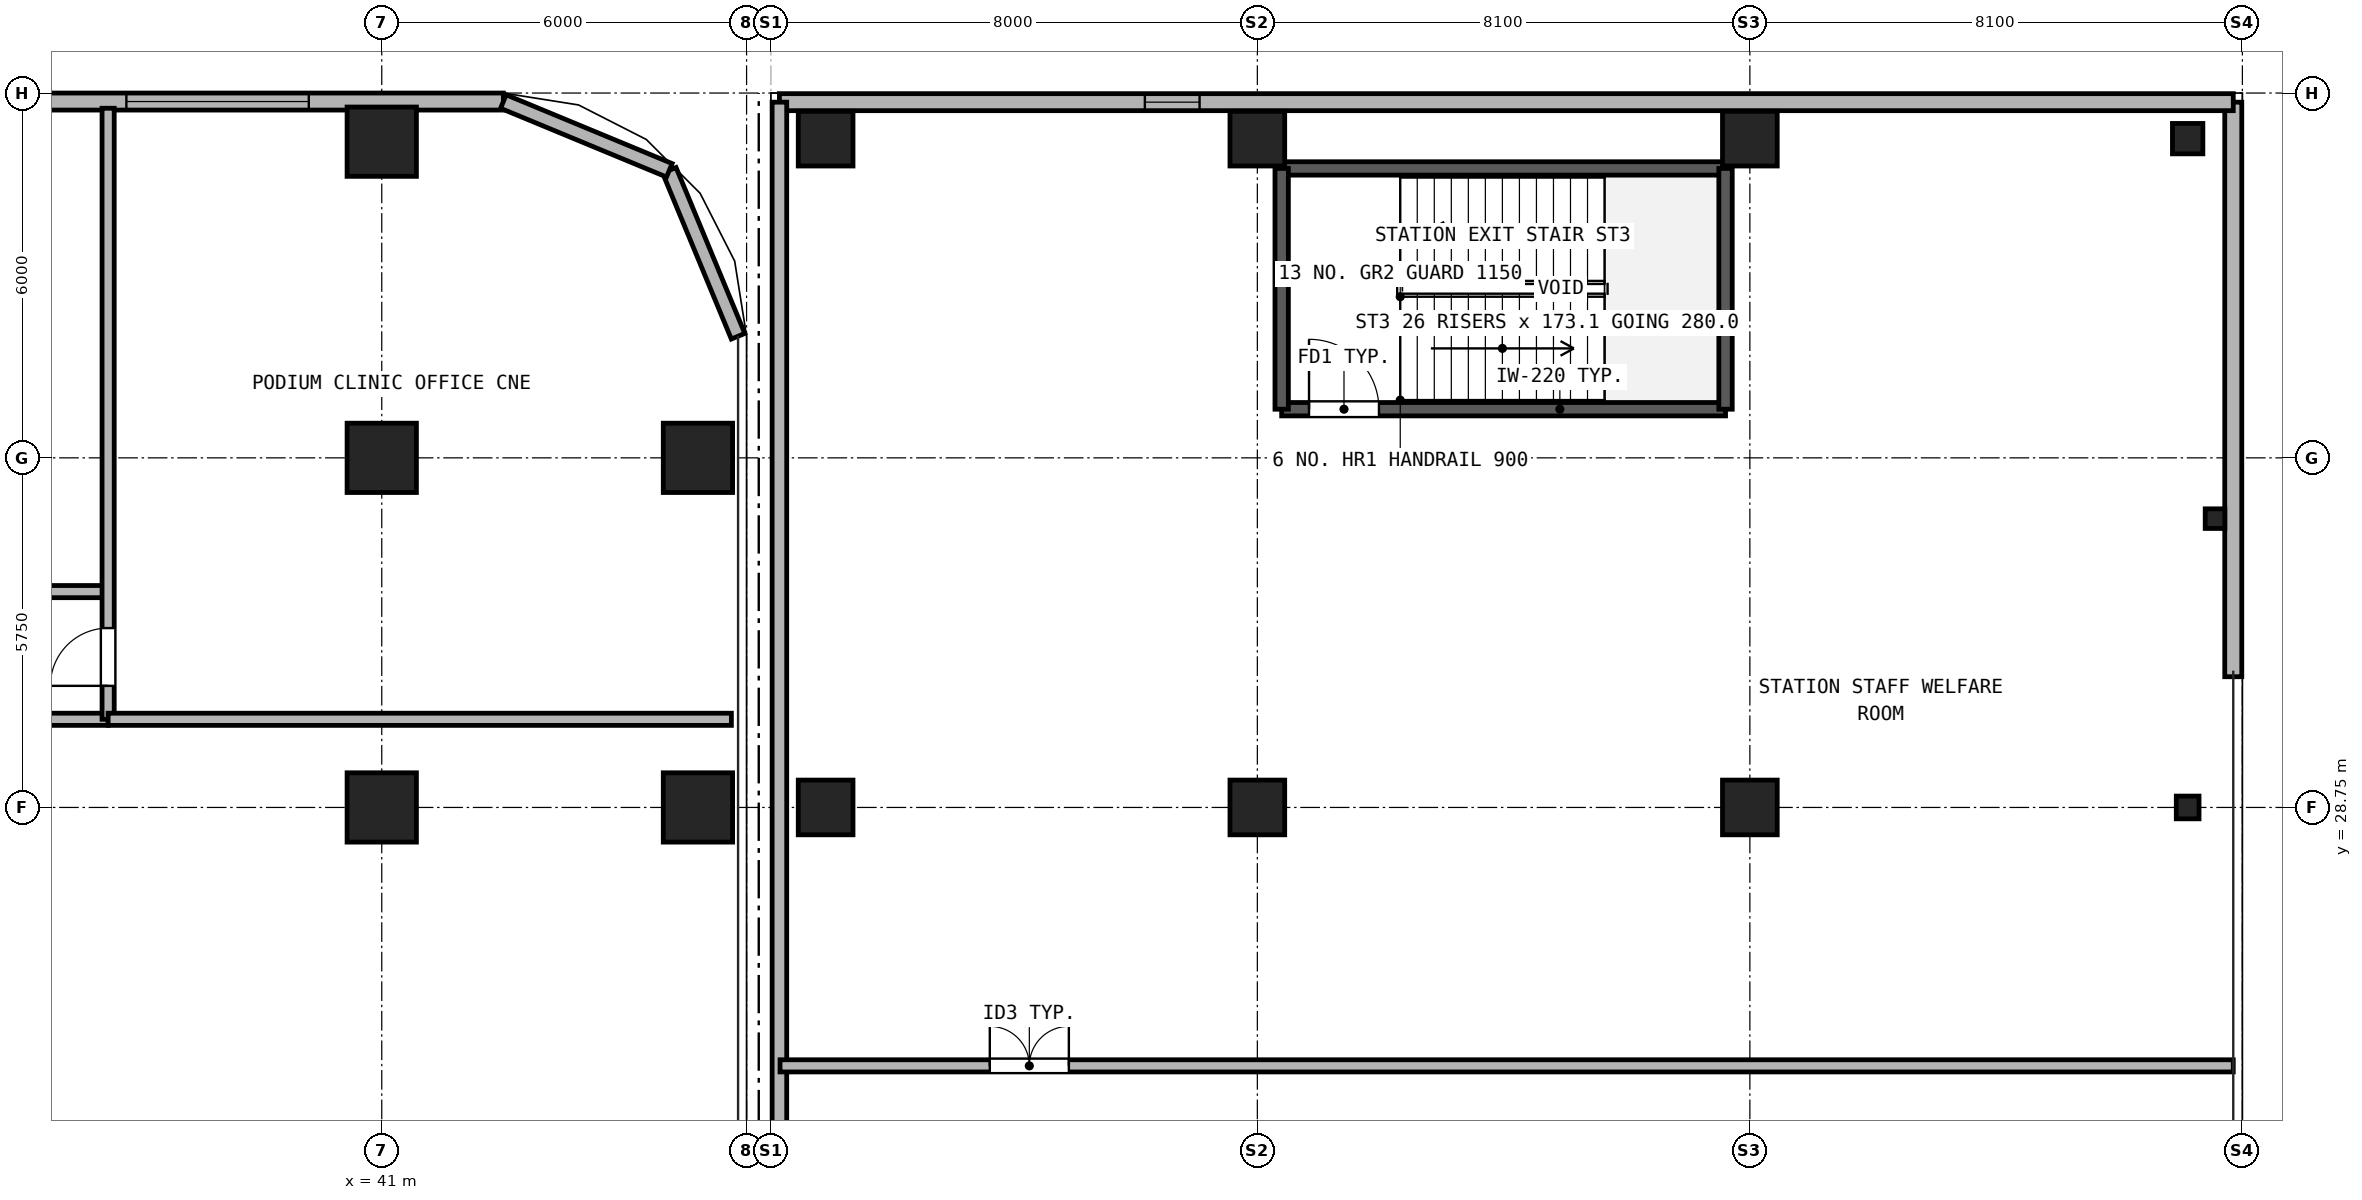
"""IFC4 building model, lengths in metres.
Left out: names, types, materials, properties, quantities, classifications, styles, units other than length and angle.
Written with IfcOpenShell. Run it as: python <this file> out.ifc"""

import sys

from ifc_helpers import new_model, si_unit, direction, frame, frame_2d, origin, origin_2d, place, context, subcontext, project, spatial, rectangle, hollow_rectangle, i_section, extrude, source, transform, mapped, element, fill, save


model = new_model("IFC4")
c1 = context("Model", 3, precision=1e-05, world=origin(), true_north=direction((0.0, 1.0)))
c2 = subcontext(c1, "Body", "Model", "MODEL_VIEW")
j1 = project(units=[si_unit("LENGTHUNIT", "METRE"), si_unit("PLANEANGLEUNIT", "RADIAN")], contexts=[c1])
p1 = place(None, origin())
s1 = spatial("IfcSite", under=j1, at=p1, CompositionType="ELEMENT")
p2 = place(p1, origin())
s2 = spatial("IfcBuilding", under=s1, at=p2, CompositionType="ELEMENT")
p3 = place(p2, frame((0.0, 0.0, 13.5)))
s3 = spatial("IfcBuildingStorey", under=s2, at=p3, CompositionType="ELEMENT", Elevation=13.5)
m1 = source(origin(), c2, "Body", "SweptSolid", [
    extrude(hollow_rectangle(XDim=1.14, YDim=1.14, WallThickness=0.07, at=origin_2d()), origin(), (0.0, 0.0, 1.0), 4.18),
])
for number, where, z_axis, x_axis in (
    (1, (41.0, 39.7, 0.0), (0.0, 0.0, 1.0), (1.0, 0.0, 0.0)),
    (2, (46.2, 28.75, 0.0), (0.0, 0.0, 1.0), (1.0, 0.0, 0.0)),
    (3, (46.2, 34.5, 0.0), (0.0, 0.0, 1.0), (1.0, 0.0, 0.0)),
    (4, (41.0, 28.75, 0.0), (0.0, 0.0, 1.0), (1.0, 0.0, 0.0)),
    (5, (41.0, 34.5, 0.0), (0.0, 0.0, 1.0), (1.0, 0.0, 0.0)),
):
    element("IfcColumn", number, at=place(p3, frame(where, z_axis=z_axis, x_axis=x_axis)), inside=s3, PredefinedType="COLUMN", context=c2, shape_type="MappedRepresentation", body=[
        mapped(m1, transform((0.0, 0.0, 0.0), x_axis=(1.0, 0.0, 0.0), y_axis=(0.0, 1.0, 0.0), z_axis=(0.0, 0.0, 1.0), scale=1.0)),
    ])
m2 = source(origin(), c2, "Body", "SweptSolid", [
    extrude(hollow_rectangle(XDim=0.7, YDim=0.9, WallThickness=0.04, at=origin_2d()), origin(), (0.0, 0.0, 1.0), 4.18),
])
for number, where, z_axis, x_axis in (
    (6, (48.3, 28.75, 0.0), (0.0, 0.0, 1.0), (1.0, 0.0, 0.0)),
    (7, (48.3, 39.75, 0.0), (0.0, 0.0, 1.0), (1.0, 0.0, 0.0)),
    (8, (55.4, 28.75, 0.0), (0.0, 0.0, 1.0), (1.0, 0.0, 0.0)),
    (9, (55.4, 39.75, 0.0), (0.0, 0.0, 1.0), (1.0, 0.0, 0.0)),
    (10, (63.5, 28.75, 0.0), (0.0, 0.0, 1.0), (1.0, 0.0, 0.0)),
    (11, (63.5, 39.75, 0.0), (0.0, 0.0, 1.0), (1.0, 0.0, 0.0)),
):
    element("IfcColumn", number, at=place(p3, frame(where, z_axis=z_axis, x_axis=x_axis)), inside=s3, PredefinedType="COLUMN", context=c2, shape_type="MappedRepresentation", body=[
        mapped(m2, transform((0.0, 0.0, 0.0), x_axis=(1.0, 0.0, 0.0), y_axis=(0.0, 1.0, 0.0), z_axis=(0.0, 0.0, 1.0), scale=1.0)),
    ])
m3 = source(origin(), c2, "Body", "SweptSolid", [
    extrude(i_section(OverallWidth=0.374, OverallDepth=0.372, WebThickness=0.016, FlangeThickness=0.026, at=origin_2d()), origin(), (0.0, 0.0, 1.0), 4.18),
])
p4 = place(p3, frame((70.7, 28.75, 0.0), z_axis=(0.0, 0.0, 1.0), x_axis=(1.0, 0.0, 0.0)))
e12 = element("IfcColumn", 12, at=p4, inside=s3, PredefinedType="COLUMN", context=c2, shape_type="MappedRepresentation", body=[
    mapped(m3, transform((0.0, 0.0, 0.0), x_axis=(1.0, 0.0, 0.0), y_axis=(0.0, 1.0, 0.0), z_axis=(0.0, 0.0, 1.0), scale=1.0)),
])
m4 = source(origin(), c2, "Body", "SweptSolid", [
    extrude(hollow_rectangle(XDim=0.5, YDim=0.5, WallThickness=0.025, at=origin_2d()), origin(), (0.0, 0.0, 1.0), 4.18),
])
p5 = place(p3, frame((70.7, 39.75, 0.0), z_axis=(0.0, 0.0, 1.0), x_axis=(1.0, 0.0, 0.0)))
e13 = element("IfcColumn", 13, at=p5, inside=s3, PredefinedType="COLUMN", context=c2, shape_type="MappedRepresentation", body=[
    mapped(m4, transform((0.0, 0.0, 0.0), x_axis=(1.0, 0.0, 0.0), y_axis=(0.0, 1.0, 0.0), z_axis=(0.0, 0.0, 1.0), scale=1.0)),
])
m5 = source(origin(), c2, "Body", "SweptSolid", [
    extrude(i_section(OverallWidth=0.309, OverallDepth=0.323, WebThickness=0.014, FlangeThickness=0.023, at=origin_2d()), origin(), (0.0, 0.0, 1.0), 4.18),
])
p6 = place(p3, frame((71.15, 33.5, 0.0), z_axis=(0.0, 0.0, 1.0), x_axis=(1.0, 0.0, 0.0)))
e14 = element("IfcColumn", 14, at=p6, inside=s3, PredefinedType="PILASTER", context=c2, shape_type="MappedRepresentation", body=[
    mapped(m5, transform((0.0, 0.0, 0.0), x_axis=(1.0, 0.0, 0.0), y_axis=(0.0, 1.0, 0.0), z_axis=(0.0, 0.0, 1.0), scale=1.0)),
])
p7 = place(p3, frame((4.0, 40.36, 0.0), z_axis=(0.0, 0.0, 1.0), x_axis=(1.0, 0.0, 0.0)))
e15 = element("IfcWall", 15, at=p7, inside=s3, PredefinedType="SOLIDWALL", context=c2, shape_type="SweptSolid", body=[
    extrude(rectangle(XDim=39.0, YDim=0.28, at=frame_2d((19.5, 0.0))), origin(), (0.0, 0.0, 1.0), 4.18),
])
p8 = place(p7, frame((4.0, 0.0, 0.9)))
e16 = element("IfcOpeningElement", 16, at=p8, cuts=e15, PredefinedType="OPENING", context=c2, shape_type="SweptSolid", body=[
    extrude(rectangle(XDim=3.0, YDim=2.25, at=frame_2d((1.5, 1.125))), frame((0.0, 0.15, 0.0), z_axis=(0.0, -1.0, 0.0), x_axis=(1.0, 0.0, 0.0)), (0.0, 0.0, 1.0), 0.3),
])
p9 = place(p7, frame((10.4, 0.0, 0.9)))
e17 = element("IfcOpeningElement", 17, at=p9, cuts=e15, PredefinedType="OPENING", context=c2, shape_type="SweptSolid", body=[
    extrude(rectangle(XDim=3.0, YDim=2.25, at=frame_2d((1.5, 1.125))), frame((0.0, 0.15, 0.0), z_axis=(0.0, -1.0, 0.0), x_axis=(1.0, 0.0, 0.0)), (0.0, 0.0, 1.0), 0.3),
])
p10 = place(p7, frame((19.5, 0.0, 0.9)))
e18 = element("IfcOpeningElement", 18, at=p10, cuts=e15, PredefinedType="OPENING", context=c2, shape_type="SweptSolid", body=[
    extrude(rectangle(XDim=3.0, YDim=2.25, at=frame_2d((1.5, 1.125))), frame((0.0, 0.15, 0.0), z_axis=(0.0, -1.0, 0.0), x_axis=(1.0, 0.0, 0.0)), (0.0, 0.0, 1.0), 0.3),
])
p11 = place(p7, frame((25.8, 0.0, 0.9)))
e19 = element("IfcOpeningElement", 19, at=p11, cuts=e15, PredefinedType="OPENING", context=c2, shape_type="SweptSolid", body=[
    extrude(rectangle(XDim=3.0, YDim=2.25, at=frame_2d((1.5, 1.125))), frame((0.0, 0.15, 0.0), z_axis=(0.0, -1.0, 0.0), x_axis=(1.0, 0.0, 0.0)), (0.0, 0.0, 1.0), 0.3),
])
p12 = place(p7, frame((32.8, 0.0, 0.9)))
e20 = element("IfcOpeningElement", 20, at=p12, cuts=e15, PredefinedType="OPENING", context=c2, shape_type="SweptSolid", body=[
    extrude(rectangle(XDim=3.0, YDim=2.25, at=frame_2d((1.5, 1.125))), frame((0.0, 0.15, 0.0), z_axis=(0.0, -1.0, 0.0), x_axis=(1.0, 0.0, 0.0)), (0.0, 0.0, 1.0), 0.3),
])
for number, where, z_axis, x_axis in (
    (21, (46.86, 36.5, 0.0), (0.0, 0.0, 1.0), (-0.383, 0.924, 0.0)),
    (22, (45.729, 39.229, 0.0), (0.0, 0.0, 1.0), (-0.924, 0.383, 0.0)),
):
    element("IfcWall", number, at=place(p3, frame(where, z_axis=z_axis, x_axis=x_axis)), inside=s3, PredefinedType="SOLIDWALL", context=c2, shape_type="SweptSolid", body=[
        extrude(rectangle(XDim=2.954, YDim=0.24, at=frame_2d((1.477, 0.0))), origin(), (0.0, 0.0, 1.0), 4.18),
    ])
p13 = place(p3, frame((71.45, 30.9, 0.0), z_axis=(0.0, 0.0, 1.0), x_axis=(0.0, 1.0, 0.0)))
e23 = element("IfcWall", 23, at=p13, inside=s3, PredefinedType="SOLIDWALL", context=c2, shape_type="SweptSolid", body=[
    extrude(rectangle(XDim=9.45, YDim=0.28, at=frame_2d((4.725, 0.0))), origin(), (0.0, 0.0, 1.0), 4.18),
])
p14 = place(p3, frame((47.54, 40.35, 0.0), z_axis=(0.0, 0.0, 1.0), x_axis=(1.0, 0.0, 0.0)))
e24 = element("IfcWall", 24, at=p14, inside=s3, PredefinedType="SOLIDWALL", context=c2, shape_type="SweptSolid", body=[
    extrude(rectangle(XDim=23.91, YDim=0.28, at=frame_2d((11.955, 0.0))), origin(), (0.0, 0.0, 1.0), 4.18),
])
p15 = place(p14, frame((6.01, 0.0, 1.1)))
e25 = element("IfcOpeningElement", 25, at=p15, cuts=e24, PredefinedType="OPENING", context=c2, shape_type="SweptSolid", body=[
    extrude(rectangle(XDim=0.9, YDim=1.5, at=frame_2d((0.45, 0.75))), frame((0.0, 0.15, 0.0), z_axis=(0.0, -1.0, 0.0), x_axis=(1.0, 0.0, 0.0)), (0.0, 0.0, 1.0), 0.3),
])
p16 = place(p3, frame((47.54, -0.54, 0.0), z_axis=(0.0, 0.0, 1.0), x_axis=(0.0, 1.0, 0.0)))
e26 = element("IfcWall", 26, at=p16, inside=s3, PredefinedType="SOLIDWALL", context=c2, shape_type="SweptSolid", body=[
    extrude(rectangle(XDim=40.89, YDim=0.24, at=frame_2d((20.445, 0.0))), origin(), (0.0, 0.0, 1.0), 4.18),
])
p17 = place(p3, frame((10.5, 32.3, 0.0), z_axis=(0.0, 0.0, 1.0), x_axis=(1.0, 0.0, 0.0)))
e27 = element("IfcWall", 27, at=p17, inside=s3, PredefinedType="PARTITIONING", context=c2, shape_type="SweptSolid", body=[
    extrude(rectangle(XDim=26.0, YDim=0.2, at=frame_2d((13.0, 0.0))), origin(), (0.0, 0.0, 1.0), 4.18),
])
p18 = place(p17, frame((4.75, 0.0, 0.0)))
e28 = element("IfcOpeningElement", 28, at=p18, cuts=e27, PredefinedType="OPENING", context=c2, shape_type="SweptSolid", body=[
    extrude(rectangle(XDim=0.95, YDim=2.15, at=frame_2d((0.475, 1.075))), frame((0.0, 0.11, 0.0), z_axis=(0.0, -1.0, 0.0), x_axis=(1.0, 0.0, 0.0)), (0.0, 0.0, 1.0), 0.22),
])
p19 = place(p17, frame((14.0, 0.0, 0.0)))
e29 = element("IfcOpeningElement", 29, at=p19, cuts=e27, PredefinedType="OPENING", context=c2, shape_type="SweptSolid", body=[
    extrude(rectangle(XDim=0.95, YDim=2.15, at=frame_2d((0.475, 1.075))), frame((0.0, 0.11, 0.0), z_axis=(0.0, -1.0, 0.0), x_axis=(1.0, 0.0, 0.0)), (0.0, 0.0, 1.0), 0.22),
])
p20 = place(p17, frame((21.75, 0.0, 0.0)))
e30 = element("IfcOpeningElement", 30, at=p20, cuts=e27, PredefinedType="OPENING", context=c2, shape_type="SweptSolid", body=[
    extrude(rectangle(XDim=0.95, YDim=2.15, at=frame_2d((0.475, 1.075))), frame((0.0, 0.11, 0.0), z_axis=(0.0, -1.0, 0.0), x_axis=(1.0, 0.0, 0.0)), (0.0, 0.0, 1.0), 0.22),
])
p21 = place(p3, frame((30.7, 30.2, 0.0), z_axis=(0.0, 0.0, 1.0), x_axis=(1.0, 0.0, 0.0)))
e31 = element("IfcWall", 31, at=p21, inside=s3, PredefinedType="PARTITIONING", context=c2, shape_type="SweptSolid", body=[
    extrude(rectangle(XDim=5.8, YDim=0.2, at=frame_2d((2.9, 0.0))), origin(), (0.0, 0.0, 1.0), 4.18),
])
p22 = place(p3, frame((36.5, 30.2, 0.0), z_axis=(0.0, 0.0, 1.0), x_axis=(0.0, 1.0, 0.0)))
e32 = element("IfcWall", 32, at=p22, inside=s3, PredefinedType="PARTITIONING", context=c2, shape_type="SweptSolid", body=[
    extrude(rectangle(XDim=10.05, YDim=0.2, at=frame_2d((5.025, 0.0))), origin(), (0.0, 0.0, 1.0), 4.18),
])
p23 = place(p22, frame((0.55, 0.0, 0.0)))
e33 = element("IfcOpeningElement", 33, at=p23, cuts=e32, PredefinedType="OPENING", context=c2, shape_type="SweptSolid", body=[
    extrude(rectangle(XDim=0.95, YDim=2.15, at=frame_2d((0.475, 1.075))), frame((0.0, 0.11, 0.0), z_axis=(0.0, -1.0, 0.0), x_axis=(1.0, 0.0, 0.0)), (0.0, 0.0, 1.0), 0.22),
])
p24 = place(p3, frame((36.5, 30.2, 0.0), z_axis=(0.0, 0.0, 1.0), x_axis=(1.0, 0.0, 0.0)))
e34 = element("IfcWall", 34, at=p24, inside=s3, PredefinedType="PARTITIONING", context=c2, shape_type="SweptSolid", body=[
    extrude(rectangle(XDim=10.25, YDim=0.2, at=frame_2d((5.125, 0.0))), origin(), (0.0, 0.0, 1.0), 4.18),
])
p25 = place(p3, frame((55.8, 35.3, 0.0), z_axis=(0.0, 0.0, 1.0), x_axis=(1.0, 0.0, 0.0)))
e35 = element("IfcWall", 35, at=p25, inside=s3, PredefinedType="SOLIDWALL", context=c2, shape_type="SweptSolid", body=[
    extrude(rectangle(XDim=7.3, YDim=0.22, at=frame_2d((3.65, 0.0))), origin(), (0.0, 0.0, 1.0), 4.18),
])
p26 = place(p25, frame((0.45, 0.0, 0.0)))
e36 = element("IfcOpeningElement", 36, at=p26, cuts=e35, PredefinedType="OPENING", context=c2, shape_type="SweptSolid", body=[
    extrude(rectangle(XDim=1.15, YDim=2.2, at=frame_2d((0.575, 1.1))), frame((0.0, 0.12, 0.0), z_axis=(0.0, -1.0, 0.0), x_axis=(1.0, 0.0, 0.0)), (0.0, 0.0, 1.0), 0.24),
])
p27 = place(p3, frame((55.8, 39.26, 0.0), z_axis=(0.0, 0.0, 1.0), x_axis=(1.0, 0.0, 0.0)))
e37 = element("IfcWall", 37, at=p27, inside=s3, PredefinedType="SOLIDWALL", context=c2, shape_type="SweptSolid", body=[
    extrude(rectangle(XDim=7.3, YDim=0.22, at=frame_2d((3.65, 0.0))), origin(), (0.0, 0.0, 1.0), 4.18),
])
for number, where, z_axis, x_axis in (
    (38, (55.8, 35.3, 0.0), (0.0, 0.0, 1.0), (0.0, 1.0, 0.0)),
    (39, (63.1, 35.3, 0.0), (0.0, 0.0, 1.0), (0.0, 1.0, 0.0)),
):
    element("IfcWall", number, at=place(p3, frame(where, z_axis=z_axis, x_axis=x_axis)), inside=s3, PredefinedType="SOLIDWALL", context=c2, shape_type="SweptSolid", body=[
        extrude(rectangle(XDim=3.96, YDim=0.22, at=frame_2d((1.98, 0.0))), origin(), (0.0, 0.0, 1.0), 4.18),
    ])
p28 = place(p3, frame((47.55, 24.5, 0.0), z_axis=(0.0, 0.0, 1.0), x_axis=(1.0, 0.0, 0.0)))
e40 = element("IfcWall", 40, at=p28, inside=s3, PredefinedType="PARTITIONING", context=c2, shape_type="SweptSolid", body=[
    extrude(rectangle(XDim=23.9, YDim=0.2, at=frame_2d((11.95, 0.0))), origin(), (0.0, 0.0, 1.0), 4.18),
])
p29 = place(p28, frame((3.45, 0.0, 0.0)))
e41 = element("IfcOpeningElement", 41, at=p29, cuts=e40, PredefinedType="OPENING", context=c2, shape_type="SweptSolid", body=[
    extrude(rectangle(XDim=1.3, YDim=2.2, at=frame_2d((0.65, 1.1))), frame((0.0, 0.11, 0.0), z_axis=(0.0, -1.0, 0.0), x_axis=(1.0, 0.0, 0.0)), (0.0, 0.0, 1.0), 0.22),
])
p30 = place(p12, origin())
e42 = element("IfcWindow", 42, at=p30, inside=s3, PartitioningType="SINGLE_PANEL", PredefinedType="WINDOW", context=c2, shape_type="SweptSolid", body=[
    extrude(rectangle(XDim=3.0, YDim=2.25, at=frame_2d((1.5, 1.125))), frame((0.0, 0.03, 0.0), z_axis=(0.0, -1.0, 0.0), x_axis=(1.0, 0.0, 0.0)), (0.0, 0.0, 1.0), 0.06),
])
fill(e20, e42)
p31 = place(p15, origin())
e43 = element("IfcWindow", 43, at=p31, inside=s3, PartitioningType="SINGLE_PANEL", PredefinedType="WINDOW", context=c2, shape_type="SweptSolid", body=[
    extrude(rectangle(XDim=0.9, YDim=1.5, at=frame_2d((0.45, 0.75))), frame((0.0, 0.03, 0.0), z_axis=(0.0, -1.0, 0.0), x_axis=(1.0, 0.0, 0.0)), (0.0, 0.0, 1.0), 0.06),
])
fill(e25, e43)
p32 = place(p23, origin())
e44 = element("IfcDoor", 44, at=p32, inside=s3, OperationType="SINGLE_SWING_LEFT", PredefinedType="DOOR", context=c2, shape_type="SweptSolid", body=[
    extrude(rectangle(XDim=0.95, YDim=2.15, at=frame_2d((0.475, 1.075))), frame((0.0, 0.025, 0.0), z_axis=(0.0, -1.0, 0.0), x_axis=(1.0, 0.0, 0.0)), (0.0, 0.0, 1.0), 0.05),
])
fill(e33, e44)
p33 = place(p26, frame((1.15, 0.0, 0.0), z_axis=(0.0, 0.0, 1.0), x_axis=(-1.0, 0.0, 0.0)))
e45 = element("IfcDoor", 45, at=p33, inside=s3, OperationType="SINGLE_SWING_LEFT", PredefinedType="DOOR", context=c2, shape_type="SweptSolid", body=[
    extrude(rectangle(XDim=1.15, YDim=2.2, at=frame_2d((0.575, 1.1))), frame((0.0, 0.025, 0.0), z_axis=(0.0, -1.0, 0.0), x_axis=(1.0, 0.0, 0.0)), (0.0, 0.0, 1.0), 0.05),
])
fill(e36, e45)
p34 = place(p29, origin())
e46 = element("IfcDoor", 46, at=p34, inside=s3, OperationType="DOUBLE_DOOR_SINGLE_SWING", PredefinedType="DOOR", context=c2, shape_type="SweptSolid", body=[
    extrude(rectangle(XDim=1.3, YDim=2.2, at=frame_2d((0.65, 1.1))), frame((0.0, 0.025, 0.0), z_axis=(0.0, -1.0, 0.0), x_axis=(1.0, 0.0, 0.0)), (0.0, 0.0, 1.0), 0.05),
])
fill(e41, e46)
save(model, sys.argv[1])
